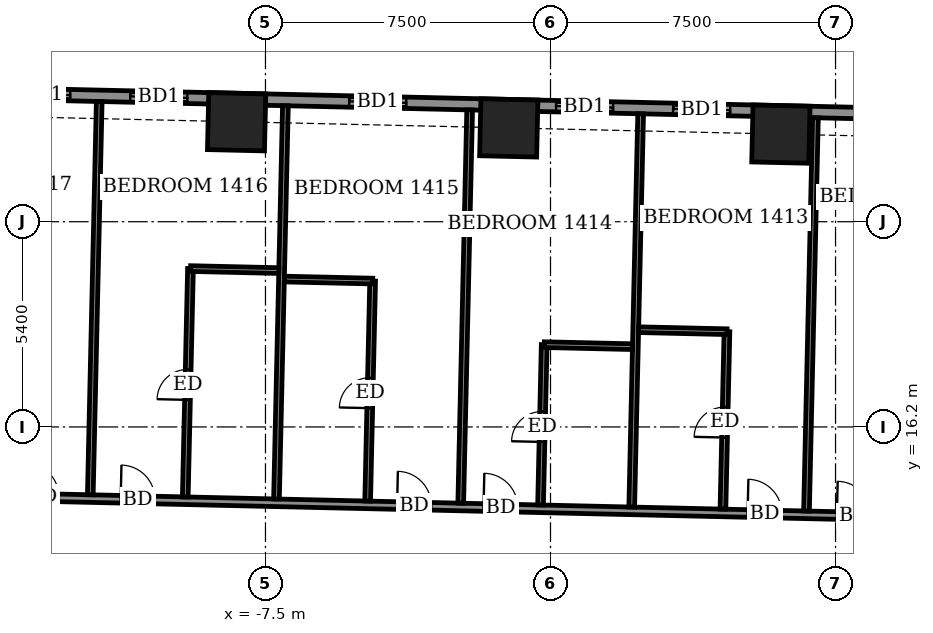
"""IFC4 building model, lengths in metres.
Left out: names, types, materials, properties, quantities, classifications, styles, units other than length and angle.
Written with IfcOpenShell. Run it as: python <this file> out.ifc"""

import sys

from ifc_helpers import new_model, si_unit, direction, frame, frame_2d, origin, origin_2d, place, context, subcontext, project, spatial, rectangle, extrude, element, fill, save


model = new_model("IFC4")
c1 = context("Model", 3, precision=1e-05, world=origin(), true_north=direction((0.0, 1.0)))
c2 = subcontext(c1, "Body", "Model", "MODEL_VIEW")
j1 = project(units=[si_unit("LENGTHUNIT", "METRE"), si_unit("PLANEANGLEUNIT", "RADIAN")], contexts=[c1])
p1 = place(None, origin())
s1 = spatial("IfcSite", under=j1, at=p1, CompositionType="ELEMENT")
p2 = place(p1, origin())
s2 = spatial("IfcBuilding", under=s1, at=p2, CompositionType="ELEMENT")
p3 = place(p2, frame((0.0, 0.0, 60.3)))
s3 = spatial("IfcBuildingStorey", under=s2, at=p3, CompositionType="ELEMENT", Elevation=60.3)
for number, where, z_axis, x_axis in (
    (1, (6.062, 23.905, -0.55), (0.0, 0.0, 1.0), (-1.0, 0.023, 0.0)),
    (2, (-1.098, 24.068, -0.55), (0.0, 0.0, 1.0), (-1.0, 0.023, 0.0)),
    (3, (-8.259, 24.23, -0.55), (0.0, 0.0, 1.0), (-1.0, 0.023, 0.0)),
):
    element("IfcColumn", number, at=place(p3, frame(where, z_axis=z_axis, x_axis=x_axis)), inside=s3, PredefinedType="COLUMN", context=c2, shape_type="SweptSolid", body=[
        extrude(rectangle(XDim=1.5, YDim=1.5, at=origin_2d()), origin(), (0.0, 0.0, 1.0), 3.6),
    ])
p4 = place(p3, frame((27.407, 24.021, 0.0), z_axis=(0.0, 0.0, 1.0), x_axis=(-0.99974239923, 0.022696589664, 0.0)))
e4 = element("IfcWall", 4, at=p4, inside=s3, PredefinedType="SOLIDWALL", context=c2, shape_type="SweptSolid", body=[
    extrude(rectangle(XDim=49.836, YDim=0.3, at=frame_2d((24.918, 0.0))), origin(), (0.0, 0.0, 1.0), 3.05),
])
p5 = place(p4, frame((2.871, 0.0, 0.0)))
e5 = element("IfcOpeningElement", 5, at=p5, cuts=e4, PredefinedType="OPENING", context=c2, shape_type="SweptSolid", body=[
    extrude(rectangle(XDim=1.5, YDim=2.4, at=frame_2d((0.75, 1.2))), frame((0.0, 0.16, 0.0), z_axis=(0.0, -1.0, 0.0), x_axis=(1.0, 0.0, 0.0)), (0.0, 0.0, 1.0), 0.32),
])
p6 = place(p4, frame((8.349, 0.0, 0.0)))
e6 = element("IfcOpeningElement", 6, at=p6, cuts=e4, PredefinedType="OPENING", context=c2, shape_type="SweptSolid", body=[
    extrude(rectangle(XDim=1.5, YDim=2.4, at=frame_2d((0.75, 1.2))), frame((0.0, 0.16, 0.0), z_axis=(0.0, -1.0, 0.0), x_axis=(1.0, 0.0, 0.0)), (0.0, 0.0, 1.0), 0.32),
])
p7 = place(p4, frame((11.43, 0.0, 0.0)))
e7 = element("IfcOpeningElement", 7, at=p7, cuts=e4, PredefinedType="OPENING", context=c2, shape_type="SweptSolid", body=[
    extrude(rectangle(XDim=1.5, YDim=2.4, at=frame_2d((0.75, 1.2))), frame((0.0, 0.16, 0.0), z_axis=(0.0, -1.0, 0.0), x_axis=(1.0, 0.0, 0.0)), (0.0, 0.0, 1.0), 0.32),
])
p8 = place(p4, frame((17.236, 0.0, 0.0)))
e8 = element("IfcOpeningElement", 8, at=p8, cuts=e4, PredefinedType="OPENING", context=c2, shape_type="SweptSolid", body=[
    extrude(rectangle(XDim=1.5, YDim=2.4, at=frame_2d((0.75, 1.2))), frame((0.0, 0.16, 0.0), z_axis=(0.0, -1.0, 0.0), x_axis=(1.0, 0.0, 0.0)), (0.0, 0.0, 1.0), 0.32),
])
p9 = place(p4, frame((22.686, 0.0, 0.0)))
e9 = element("IfcOpeningElement", 9, at=p9, cuts=e4, PredefinedType="OPENING", context=c2, shape_type="SweptSolid", body=[
    extrude(rectangle(XDim=1.5, YDim=2.4, at=frame_2d((0.75, 1.2))), frame((0.0, 0.16, 0.0), z_axis=(0.0, -1.0, 0.0), x_axis=(1.0, 0.0, 0.0)), (0.0, 0.0, 1.0), 0.32),
])
p10 = place(p4, frame((25.767, 0.0, 0.0)))
e10 = element("IfcOpeningElement", 10, at=p10, cuts=e4, PredefinedType="OPENING", context=c2, shape_type="SweptSolid", body=[
    extrude(rectangle(XDim=1.5, YDim=2.4, at=frame_2d((0.75, 1.2))), frame((0.0, 0.16, 0.0), z_axis=(0.0, -1.0, 0.0), x_axis=(1.0, 0.0, 0.0)), (0.0, 0.0, 1.0), 0.32),
])
p11 = place(p4, frame((31.211, 0.0, 0.0)))
e11 = element("IfcOpeningElement", 11, at=p11, cuts=e4, PredefinedType="OPENING", context=c2, shape_type="SweptSolid", body=[
    extrude(rectangle(XDim=1.5, YDim=2.4, at=frame_2d((0.75, 1.2))), frame((0.0, 0.16, 0.0), z_axis=(0.0, -1.0, 0.0), x_axis=(1.0, 0.0, 0.0)), (0.0, 0.0, 1.0), 0.32),
])
p12 = place(p4, frame((36.974, 0.0, 0.0)))
e12 = element("IfcOpeningElement", 12, at=p12, cuts=e4, PredefinedType="OPENING", context=c2, shape_type="SweptSolid", body=[
    extrude(rectangle(XDim=1.5, YDim=2.4, at=frame_2d((0.75, 1.2))), frame((0.0, 0.16, 0.0), z_axis=(0.0, -1.0, 0.0), x_axis=(1.0, 0.0, 0.0)), (0.0, 0.0, 1.0), 0.32),
])
p13 = place(p4, frame((40.055, 0.0, 0.0)))
e13 = element("IfcOpeningElement", 13, at=p13, cuts=e4, PredefinedType="OPENING", context=c2, shape_type="SweptSolid", body=[
    extrude(rectangle(XDim=1.5, YDim=2.4, at=frame_2d((0.75, 1.2))), frame((0.0, 0.16, 0.0), z_axis=(0.0, -1.0, 0.0), x_axis=(1.0, 0.0, 0.0)), (0.0, 0.0, 1.0), 0.32),
])
p14 = place(p4, frame((45.282, 0.0, 0.9)))
e14 = element("IfcOpeningElement", 14, at=p14, cuts=e4, PredefinedType="OPENING", context=c2, shape_type="SweptSolid", body=[
    extrude(rectangle(XDim=2.4, YDim=1.5, at=frame_2d((1.2, 0.75))), frame((0.0, 0.16, 0.0), z_axis=(0.0, -1.0, 0.0), x_axis=(1.0, 0.0, 0.0)), (0.0, 0.0, 1.0), 0.32),
])
p15 = place(p3, frame((-25.456, 14.618, 0.0), z_axis=(0.0, 0.0, 1.0), x_axis=(0.999742687583, -0.0226838847, 0.0)))
e15 = element("IfcWall", 15, at=p15, inside=s3, PredefinedType="PARTITIONING", context=c2, shape_type="SweptSolid", body=[
    extrude(rectangle(XDim=54.836, YDim=0.2, at=frame_2d((27.418, 0.0))), origin(), (0.0, 0.0, 1.0), 3.05),
])
p16 = place(p15, frame((52.493, 0.0, 0.0)))
e16 = element("IfcOpeningElement", 16, at=p16, cuts=e15, PredefinedType="OPENING", context=c2, shape_type="SweptSolid", body=[
    extrude(rectangle(XDim=1.0, YDim=2.1, at=frame_2d((0.5, 1.05))), frame((0.0, 0.11, 0.0), z_axis=(0.0, -1.0, 0.0), x_axis=(1.0, 0.0, 0.0)), (0.0, 0.0, 1.0), 0.22),
])
p17 = place(p15, frame((47.25, 0.0, 0.0)))
e17 = element("IfcOpeningElement", 17, at=p17, cuts=e15, PredefinedType="OPENING", context=c2, shape_type="SweptSolid", body=[
    extrude(rectangle(XDim=0.9, YDim=2.1, at=frame_2d((0.45, 1.05))), frame((0.0, 0.11, 0.0), z_axis=(0.0, -1.0, 0.0), x_axis=(1.0, 0.0, 0.0)), (0.0, 0.0, 1.0), 0.22),
])
p18 = place(p15, frame((42.525, 0.0, 0.0)))
e18 = element("IfcOpeningElement", 18, at=p18, cuts=e15, PredefinedType="OPENING", context=c2, shape_type="SweptSolid", body=[
    extrude(rectangle(XDim=0.9, YDim=2.1, at=frame_2d((0.45, 1.05))), frame((0.0, 0.11, 0.0), z_axis=(0.0, -1.0, 0.0), x_axis=(1.0, 0.0, 0.0)), (0.0, 0.0, 1.0), 0.22),
])
p19 = place(p15, frame((40.275, 0.0, 0.0)))
e19 = element("IfcOpeningElement", 19, at=p19, cuts=e15, PredefinedType="OPENING", context=c2, shape_type="SweptSolid", body=[
    extrude(rectangle(XDim=0.9, YDim=2.1, at=frame_2d((0.45, 1.05))), frame((0.0, 0.11, 0.0), z_axis=(0.0, -1.0, 0.0), x_axis=(1.0, 0.0, 0.0)), (0.0, 0.0, 1.0), 0.22),
])
p20 = place(p15, frame((33.0, 0.0, 0.0)))
e20 = element("IfcOpeningElement", 20, at=p20, cuts=e15, PredefinedType="OPENING", context=c2, shape_type="SweptSolid", body=[
    extrude(rectangle(XDim=0.9, YDim=2.1, at=frame_2d((0.45, 1.05))), frame((0.0, 0.11, 0.0), z_axis=(0.0, -1.0, 0.0), x_axis=(1.0, 0.0, 0.0)), (0.0, 0.0, 1.0), 0.22),
])
p21 = place(p15, frame((30.65, 0.0, 0.0)))
e21 = element("IfcOpeningElement", 21, at=p21, cuts=e15, PredefinedType="OPENING", context=c2, shape_type="SweptSolid", body=[
    extrude(rectangle(XDim=0.9, YDim=2.1, at=frame_2d((0.45, 1.05))), frame((0.0, 0.11, 0.0), z_axis=(0.0, -1.0, 0.0), x_axis=(1.0, 0.0, 0.0)), (0.0, 0.0, 1.0), 0.22),
])
p22 = place(p15, frame((23.7, 0.0, 0.0)))
e22 = element("IfcOpeningElement", 22, at=p22, cuts=e15, PredefinedType="OPENING", context=c2, shape_type="SweptSolid", body=[
    extrude(rectangle(XDim=0.9, YDim=2.1, at=frame_2d((0.45, 1.05))), frame((0.0, 0.11, 0.0), z_axis=(0.0, -1.0, 0.0), x_axis=(1.0, 0.0, 0.0)), (0.0, 0.0, 1.0), 0.22),
])
p23 = place(p15, frame((21.425, 0.0, 0.0)))
e23 = element("IfcOpeningElement", 23, at=p23, cuts=e15, PredefinedType="OPENING", context=c2, shape_type="SweptSolid", body=[
    extrude(rectangle(XDim=0.9, YDim=2.1, at=frame_2d((0.45, 1.05))), frame((0.0, 0.11, 0.0), z_axis=(0.0, -1.0, 0.0), x_axis=(1.0, 0.0, 0.0)), (0.0, 0.0, 1.0), 0.22),
])
p24 = place(p15, frame((14.15, 0.0, 0.0)))
e24 = element("IfcOpeningElement", 24, at=p24, cuts=e15, PredefinedType="OPENING", context=c2, shape_type="SweptSolid", body=[
    extrude(rectangle(XDim=0.9, YDim=2.1, at=frame_2d((0.45, 1.05))), frame((0.0, 0.11, 0.0), z_axis=(0.0, -1.0, 0.0), x_axis=(1.0, 0.0, 0.0)), (0.0, 0.0, 1.0), 0.22),
])
p25 = place(p15, frame((11.625, 0.0, 0.0)))
e25 = element("IfcOpeningElement", 25, at=p25, cuts=e15, PredefinedType="OPENING", context=c2, shape_type="SweptSolid", body=[
    extrude(rectangle(XDim=0.9, YDim=2.1, at=frame_2d((0.45, 1.05))), frame((0.0, 0.11, 0.0), z_axis=(0.0, -1.0, 0.0), x_axis=(1.0, 0.0, 0.0)), (0.0, 0.0, 1.0), 0.22),
])
p26 = place(p15, frame((1.425, 0.0, 0.0)))
e26 = element("IfcOpeningElement", 26, at=p26, cuts=e15, PredefinedType="OPENING", context=c2, shape_type="SweptSolid", body=[
    extrude(rectangle(XDim=1.0, YDim=2.1, at=frame_2d((0.5, 1.05))), frame((0.0, 0.11, 0.0), z_axis=(0.0, -1.0, 0.0), x_axis=(1.0, 0.0, 0.0)), (0.0, 0.0, 1.0), 0.22),
])
p27 = place(p15, frame((6.75, 0.0, 0.0)))
e27 = element("IfcOpeningElement", 27, at=p27, cuts=e15, PredefinedType="OPENING", context=c2, shape_type="SweptSolid", body=[
    extrude(rectangle(XDim=0.9, YDim=2.1, at=frame_2d((0.45, 1.05))), frame((0.0, 0.11, 0.0), z_axis=(0.0, -1.0, 0.0), x_axis=(1.0, 0.0, 0.0)), (0.0, 0.0, 1.0), 0.22),
])
p28 = place(p3, frame((-12.109, 14.415, 0.0), z_axis=(0.0, 0.0, 1.0), x_axis=(0.022690865001, 0.999742529177, 0.0)))
e28 = element("IfcWall", 28, at=p28, inside=s3, PredefinedType="PARTITIONING", context=c2, shape_type="SweptSolid", body=[
    extrude(rectangle(XDim=10.351, YDim=0.15, at=frame_2d((5.175, 0.0))), origin(), (0.0, 0.0, 1.0), 2.55),
])
p29 = place(p3, frame((-9.61, 14.358, 0.0), z_axis=(0.0, 0.0, 1.0), x_axis=(0.022827512011, 0.999739418396, 0.0)))
e29 = element("IfcWall", 29, at=p29, inside=s3, PredefinedType="PARTITIONING", context=c2, shape_type="SweptSolid", body=[
    extrude(rectangle(XDim=6.01, YDim=0.15, at=frame_2d((3.005, 0.0))), origin(), (0.0, 0.0, 1.0), 3.05),
])
p30 = place(p29, frame((2.555, 0.0, 0.0)))
e30 = element("IfcOpeningElement", 30, at=p30, cuts=e29, PredefinedType="OPENING", context=c2, shape_type="SweptSolid", body=[
    extrude(rectangle(XDim=0.8, YDim=2.1, at=frame_2d((0.4, 1.05))), frame((0.0, 0.085, 0.0), z_axis=(0.0, -1.0, 0.0), x_axis=(1.0, 0.0, 0.0)), (0.0, 0.0, 1.0), 0.17),
])
p31 = place(p3, frame((-7.21, 14.304, 0.0), z_axis=(0.0, 0.0, 1.0), x_axis=(0.022693005506, 0.999742480592, 0.0)))
e31 = element("IfcWall", 31, at=p31, inside=s3, PredefinedType="PARTITIONING", context=c2, shape_type="SweptSolid", body=[
    extrude(rectangle(XDim=10.35, YDim=0.15, at=frame_2d((5.175, 0.0))), origin(), (0.0, 0.0, 1.0), 2.55),
])
p32 = place(p3, frame((-4.811, 14.25, 0.0), z_axis=(0.0, 0.0, 1.0), x_axis=(0.022644773889, 0.999743574231, 0.0)))
e32 = element("IfcWall", 32, at=p32, inside=s3, PredefinedType="PARTITIONING", context=c2, shape_type="SweptSolid", body=[
    extrude(rectangle(XDim=5.79, YDim=0.15, at=frame_2d((2.895, 0.0))), origin(), (0.0, 0.0, 1.0), 3.05),
])
p33 = place(p32, frame((2.445, 0.0, 0.0)))
e33 = element("IfcOpeningElement", 33, at=p33, cuts=e32, PredefinedType="OPENING", context=c2, shape_type="SweptSolid", body=[
    extrude(rectangle(XDim=0.8, YDim=2.1, at=frame_2d((0.4, 1.05))), frame((0.0, 0.085, 0.0), z_axis=(0.0, -1.0, 0.0), x_axis=(1.0, 0.0, 0.0)), (0.0, 0.0, 1.0), 0.17),
])
p34 = place(p3, frame((-2.362, 14.194, 0.0), z_axis=(0.0, 0.0, 1.0), x_axis=(0.022716582742, 0.999741945138, 0.0)))
e34 = element("IfcWall", 34, at=p34, inside=s3, PredefinedType="PARTITIONING", context=c2, shape_type="SweptSolid", body=[
    extrude(rectangle(XDim=10.35, YDim=0.15, at=frame_2d((5.175, 0.0))), origin(), (0.0, 0.0, 1.0), 2.55),
])
p35 = place(p3, frame((-0.262, 14.146, 0.0), z_axis=(0.0, 0.0, 1.0), x_axis=(0.0227358609, 0.999741506905, 0.0)))
e35 = element("IfcWall", 35, at=p35, inside=s3, PredefinedType="PARTITIONING", context=c2, shape_type="SweptSolid", body=[
    extrude(rectangle(XDim=4.22, YDim=0.15, at=frame_2d((2.11, 0.0))), origin(), (0.0, 0.0, 1.0), 3.05),
])
p36 = place(p35, frame((1.66, 0.0, 0.0)))
e36 = element("IfcOpeningElement", 36, at=p36, cuts=e35, PredefinedType="OPENING", context=c2, shape_type="SweptSolid", body=[
    extrude(rectangle(XDim=0.8, YDim=2.1, at=frame_2d((0.4, 1.05))), frame((0.0, 0.085, 0.0), z_axis=(0.0, -1.0, 0.0), x_axis=(1.0, 0.0, 0.0)), (0.0, 0.0, 1.0), 0.17),
])
p37 = place(p3, frame((2.137, 14.092, 0.0), z_axis=(0.0, 0.0, 1.0), x_axis=(0.022716582742, 0.999741945138, 0.0)))
e37 = element("IfcWall", 37, at=p37, inside=s3, PredefinedType="PARTITIONING", context=c2, shape_type="SweptSolid", body=[
    extrude(rectangle(XDim=10.35, YDim=0.15, at=frame_2d((5.175, 0.0))), origin(), (0.0, 0.0, 1.0), 2.55),
])
p38 = place(p3, frame((4.537, 14.037, 0.0), z_axis=(0.0, 0.0, 1.0), x_axis=(0.022688155425, 0.999742590672, 0.0)))
e38 = element("IfcWall", 38, at=p38, inside=s3, PredefinedType="PARTITIONING", context=c2, shape_type="SweptSolid", body=[
    extrude(rectangle(XDim=4.67, YDim=0.15, at=frame_2d((2.335, 0.0))), origin(), (0.0, 0.0, 1.0), 3.05),
])
p39 = place(p38, frame((1.885, 0.0, 0.0)))
e39 = element("IfcOpeningElement", 39, at=p39, cuts=e38, PredefinedType="OPENING", context=c2, shape_type="SweptSolid", body=[
    extrude(rectangle(XDim=0.8, YDim=2.1, at=frame_2d((0.4, 1.05))), frame((0.0, 0.085, 0.0), z_axis=(0.0, -1.0, 0.0), x_axis=(1.0, 0.0, 0.0)), (0.0, 0.0, 1.0), 0.17),
])
p40 = place(p3, frame((6.736, 13.988, 0.0), z_axis=(0.0, 0.0, 1.0), x_axis=(0.022693005506, 0.999742480592, 0.0)))
e40 = element("IfcWall", 40, at=p40, inside=s3, PredefinedType="PARTITIONING", context=c2, shape_type="SweptSolid", body=[
    extrude(rectangle(XDim=10.35, YDim=0.15, at=frame_2d((5.175, 0.0))), origin(), (0.0, 0.0, 1.0), 2.55),
])
p41 = place(p3, frame((-0.164, 18.365, 0.0), z_axis=(0.0, 0.0, 1.0), x_axis=(0.999740260747, -0.02279059109, 0.0)))
e41 = element("IfcWall", 41, at=p41, inside=s3, PredefinedType="PARTITIONING", context=c2, shape_type="SweptSolid", body=[
    extrude(rectangle(XDim=2.324, YDim=0.15, at=frame_2d((1.162, 0.0))), origin(), (0.0, 0.0, 1.0), 3.05),
])
p42 = place(p3, frame((2.32, 18.759, 0.0), z_axis=(0.0, 0.0, 1.0), x_axis=(0.999740478815, -0.022781023197, 0.0)))
e42 = element("IfcWall", 42, at=p42, inside=s3, PredefinedType="PARTITIONING", context=c2, shape_type="SweptSolid", body=[
    extrude(rectangle(XDim=2.325, YDim=0.15, at=frame_2d((1.163, 0.0))), origin(), (0.0, 0.0, 1.0), 3.05),
])
for number, where, z_axis, x_axis in (
    (43, (-7.002, 20.091, 0.0), (0.0, 0.0, 1.0), (1.0, -0.023, 0.0)),
    (44, (-9.471, 20.367, 0.0), (0.0, 0.0, 1.0), (1.0, -0.023, 0.0)),
):
    element("IfcWall", number, at=place(p3, frame(where, z_axis=z_axis, x_axis=x_axis)), inside=s3, PredefinedType="PARTITIONING", context=c2, shape_type="SweptSolid", body=[
        extrude(rectangle(XDim=2.324, YDim=0.15, at=frame_2d((1.162, 0.0))), origin(), (0.0, 0.0, 1.0), 3.05),
    ])
p43 = place(p9, origin())
e45 = element("IfcDoor", 45, at=p43, inside=s3, OperationType="SLIDING_TO_LEFT", PredefinedType="DOOR", context=c2, shape_type="SweptSolid", body=[
    extrude(rectangle(XDim=1.5, YDim=2.4, at=frame_2d((0.75, 1.2))), frame((0.0, 0.025, 0.0), z_axis=(0.0, -1.0, 0.0), x_axis=(1.0, 0.0, 0.0)), (0.0, 0.0, 1.0), 0.05),
])
fill(e9, e45)
p44 = place(p10, origin())
e46 = element("IfcDoor", 46, at=p44, inside=s3, OperationType="SLIDING_TO_LEFT", PredefinedType="DOOR", context=c2, shape_type="SweptSolid", body=[
    extrude(rectangle(XDim=1.5, YDim=2.4, at=frame_2d((0.75, 1.2))), frame((0.0, 0.025, 0.0), z_axis=(0.0, -1.0, 0.0), x_axis=(1.0, 0.0, 0.0)), (0.0, 0.0, 1.0), 0.05),
])
fill(e10, e46)
p45 = place(p11, origin())
e47 = element("IfcDoor", 47, at=p45, inside=s3, OperationType="SLIDING_TO_LEFT", PredefinedType="DOOR", context=c2, shape_type="SweptSolid", body=[
    extrude(rectangle(XDim=1.5, YDim=2.4, at=frame_2d((0.75, 1.2))), frame((0.0, 0.025, 0.0), z_axis=(0.0, -1.0, 0.0), x_axis=(1.0, 0.0, 0.0)), (0.0, 0.0, 1.0), 0.05),
])
fill(e11, e47)
p46 = place(p12, origin())
e48 = element("IfcDoor", 48, at=p46, inside=s3, OperationType="SLIDING_TO_LEFT", PredefinedType="DOOR", context=c2, shape_type="SweptSolid", body=[
    extrude(rectangle(XDim=1.5, YDim=2.4, at=frame_2d((0.75, 1.2))), frame((0.0, 0.025, 0.0), z_axis=(0.0, -1.0, 0.0), x_axis=(1.0, 0.0, 0.0)), (0.0, 0.0, 1.0), 0.05),
])
fill(e12, e48)
p47 = place(p13, origin())
e49 = element("IfcDoor", 49, at=p47, inside=s3, OperationType="SLIDING_TO_LEFT", PredefinedType="DOOR", context=c2, shape_type="SweptSolid", body=[
    extrude(rectangle(XDim=1.5, YDim=2.4, at=frame_2d((0.75, 1.2))), frame((0.0, 0.025, 0.0), z_axis=(0.0, -1.0, 0.0), x_axis=(1.0, 0.0, 0.0)), (0.0, 0.0, 1.0), 0.05),
])
fill(e13, e49)
p48 = place(p20, origin())
e50 = element("IfcDoor", 50, at=p48, inside=s3, OperationType="SINGLE_SWING_RIGHT", PredefinedType="DOOR", context=c2, shape_type="SweptSolid", body=[
    extrude(rectangle(XDim=0.9, YDim=2.1, at=frame_2d((0.45, 1.05))), frame((0.0, 0.025, 0.0), z_axis=(0.0, -1.0, 0.0), x_axis=(1.0, 0.0, 0.0)), (0.0, 0.0, 1.0), 0.05),
])
fill(e20, e50)
p49 = place(p21, origin())
e51 = element("IfcDoor", 51, at=p49, inside=s3, OperationType="SINGLE_SWING_LEFT", PredefinedType="DOOR", context=c2, shape_type="SweptSolid", body=[
    extrude(rectangle(XDim=0.9, YDim=2.1, at=frame_2d((0.45, 1.05))), frame((0.0, 0.025, 0.0), z_axis=(0.0, -1.0, 0.0), x_axis=(1.0, 0.0, 0.0)), (0.0, 0.0, 1.0), 0.05),
])
fill(e21, e51)
p50 = place(p39, origin())
e52 = element("IfcDoor", 52, at=p50, inside=s3, OperationType="SINGLE_SWING_LEFT", PredefinedType="DOOR", context=c2, shape_type="SweptSolid", body=[
    extrude(rectangle(XDim=0.8, YDim=2.1, at=frame_2d((0.4, 1.05))), frame((0.0, 0.025, 0.0), z_axis=(0.0, -1.0, 0.0), x_axis=(1.0, 0.0, 0.0)), (0.0, 0.0, 1.0), 0.05),
])
fill(e39, e52)
p51 = place(p22, origin())
e53 = element("IfcDoor", 53, at=p51, inside=s3, OperationType="SINGLE_SWING_RIGHT", PredefinedType="DOOR", context=c2, shape_type="SweptSolid", body=[
    extrude(rectangle(XDim=0.9, YDim=2.1, at=frame_2d((0.45, 1.05))), frame((0.0, 0.025, 0.0), z_axis=(0.0, -1.0, 0.0), x_axis=(1.0, 0.0, 0.0)), (0.0, 0.0, 1.0), 0.05),
])
fill(e22, e53)
p52 = place(p36, origin())
e54 = element("IfcDoor", 54, at=p52, inside=s3, OperationType="SINGLE_SWING_RIGHT", PredefinedType="DOOR", context=c2, shape_type="SweptSolid", body=[
    extrude(rectangle(XDim=0.8, YDim=2.1, at=frame_2d((0.4, 1.05))), frame((0.0, 0.025, 0.0), z_axis=(0.0, -1.0, 0.0), x_axis=(1.0, 0.0, 0.0)), (0.0, 0.0, 1.0), 0.05),
])
fill(e36, e54)
p53 = place(p23, origin())
e55 = element("IfcDoor", 55, at=p53, inside=s3, OperationType="SINGLE_SWING_LEFT", PredefinedType="DOOR", context=c2, shape_type="SweptSolid", body=[
    extrude(rectangle(XDim=0.9, YDim=2.1, at=frame_2d((0.45, 1.05))), frame((0.0, 0.025, 0.0), z_axis=(0.0, -1.0, 0.0), x_axis=(1.0, 0.0, 0.0)), (0.0, 0.0, 1.0), 0.05),
])
fill(e23, e55)
p54 = place(p33, origin())
e56 = element("IfcDoor", 56, at=p54, inside=s3, OperationType="SINGLE_SWING_LEFT", PredefinedType="DOOR", context=c2, shape_type="SweptSolid", body=[
    extrude(rectangle(XDim=0.8, YDim=2.1, at=frame_2d((0.4, 1.05))), frame((0.0, 0.025, 0.0), z_axis=(0.0, -1.0, 0.0), x_axis=(1.0, 0.0, 0.0)), (0.0, 0.0, 1.0), 0.05),
])
fill(e33, e56)
p55 = place(p24, origin())
e57 = element("IfcDoor", 57, at=p55, inside=s3, OperationType="SINGLE_SWING_RIGHT", PredefinedType="DOOR", context=c2, shape_type="SweptSolid", body=[
    extrude(rectangle(XDim=0.9, YDim=2.1, at=frame_2d((0.45, 1.05))), frame((0.0, 0.025, 0.0), z_axis=(0.0, -1.0, 0.0), x_axis=(1.0, 0.0, 0.0)), (0.0, 0.0, 1.0), 0.05),
])
fill(e24, e57)
p56 = place(p30, origin())
e58 = element("IfcDoor", 58, at=p56, inside=s3, OperationType="SINGLE_SWING_RIGHT", PredefinedType="DOOR", context=c2, shape_type="SweptSolid", body=[
    extrude(rectangle(XDim=0.8, YDim=2.1, at=frame_2d((0.4, 1.05))), frame((0.0, 0.025, 0.0), z_axis=(0.0, -1.0, 0.0), x_axis=(1.0, 0.0, 0.0)), (0.0, 0.0, 1.0), 0.05),
])
fill(e30, e58)
p57 = place(p25, origin())
e59 = element("IfcDoor", 59, at=p57, inside=s3, OperationType="SINGLE_SWING_LEFT", PredefinedType="DOOR", context=c2, shape_type="SweptSolid", body=[
    extrude(rectangle(XDim=0.9, YDim=2.1, at=frame_2d((0.45, 1.05))), frame((0.0, 0.025, 0.0), z_axis=(0.0, -1.0, 0.0), x_axis=(1.0, 0.0, 0.0)), (0.0, 0.0, 1.0), 0.05),
])
fill(e25, e59)
save(model, sys.argv[1])
